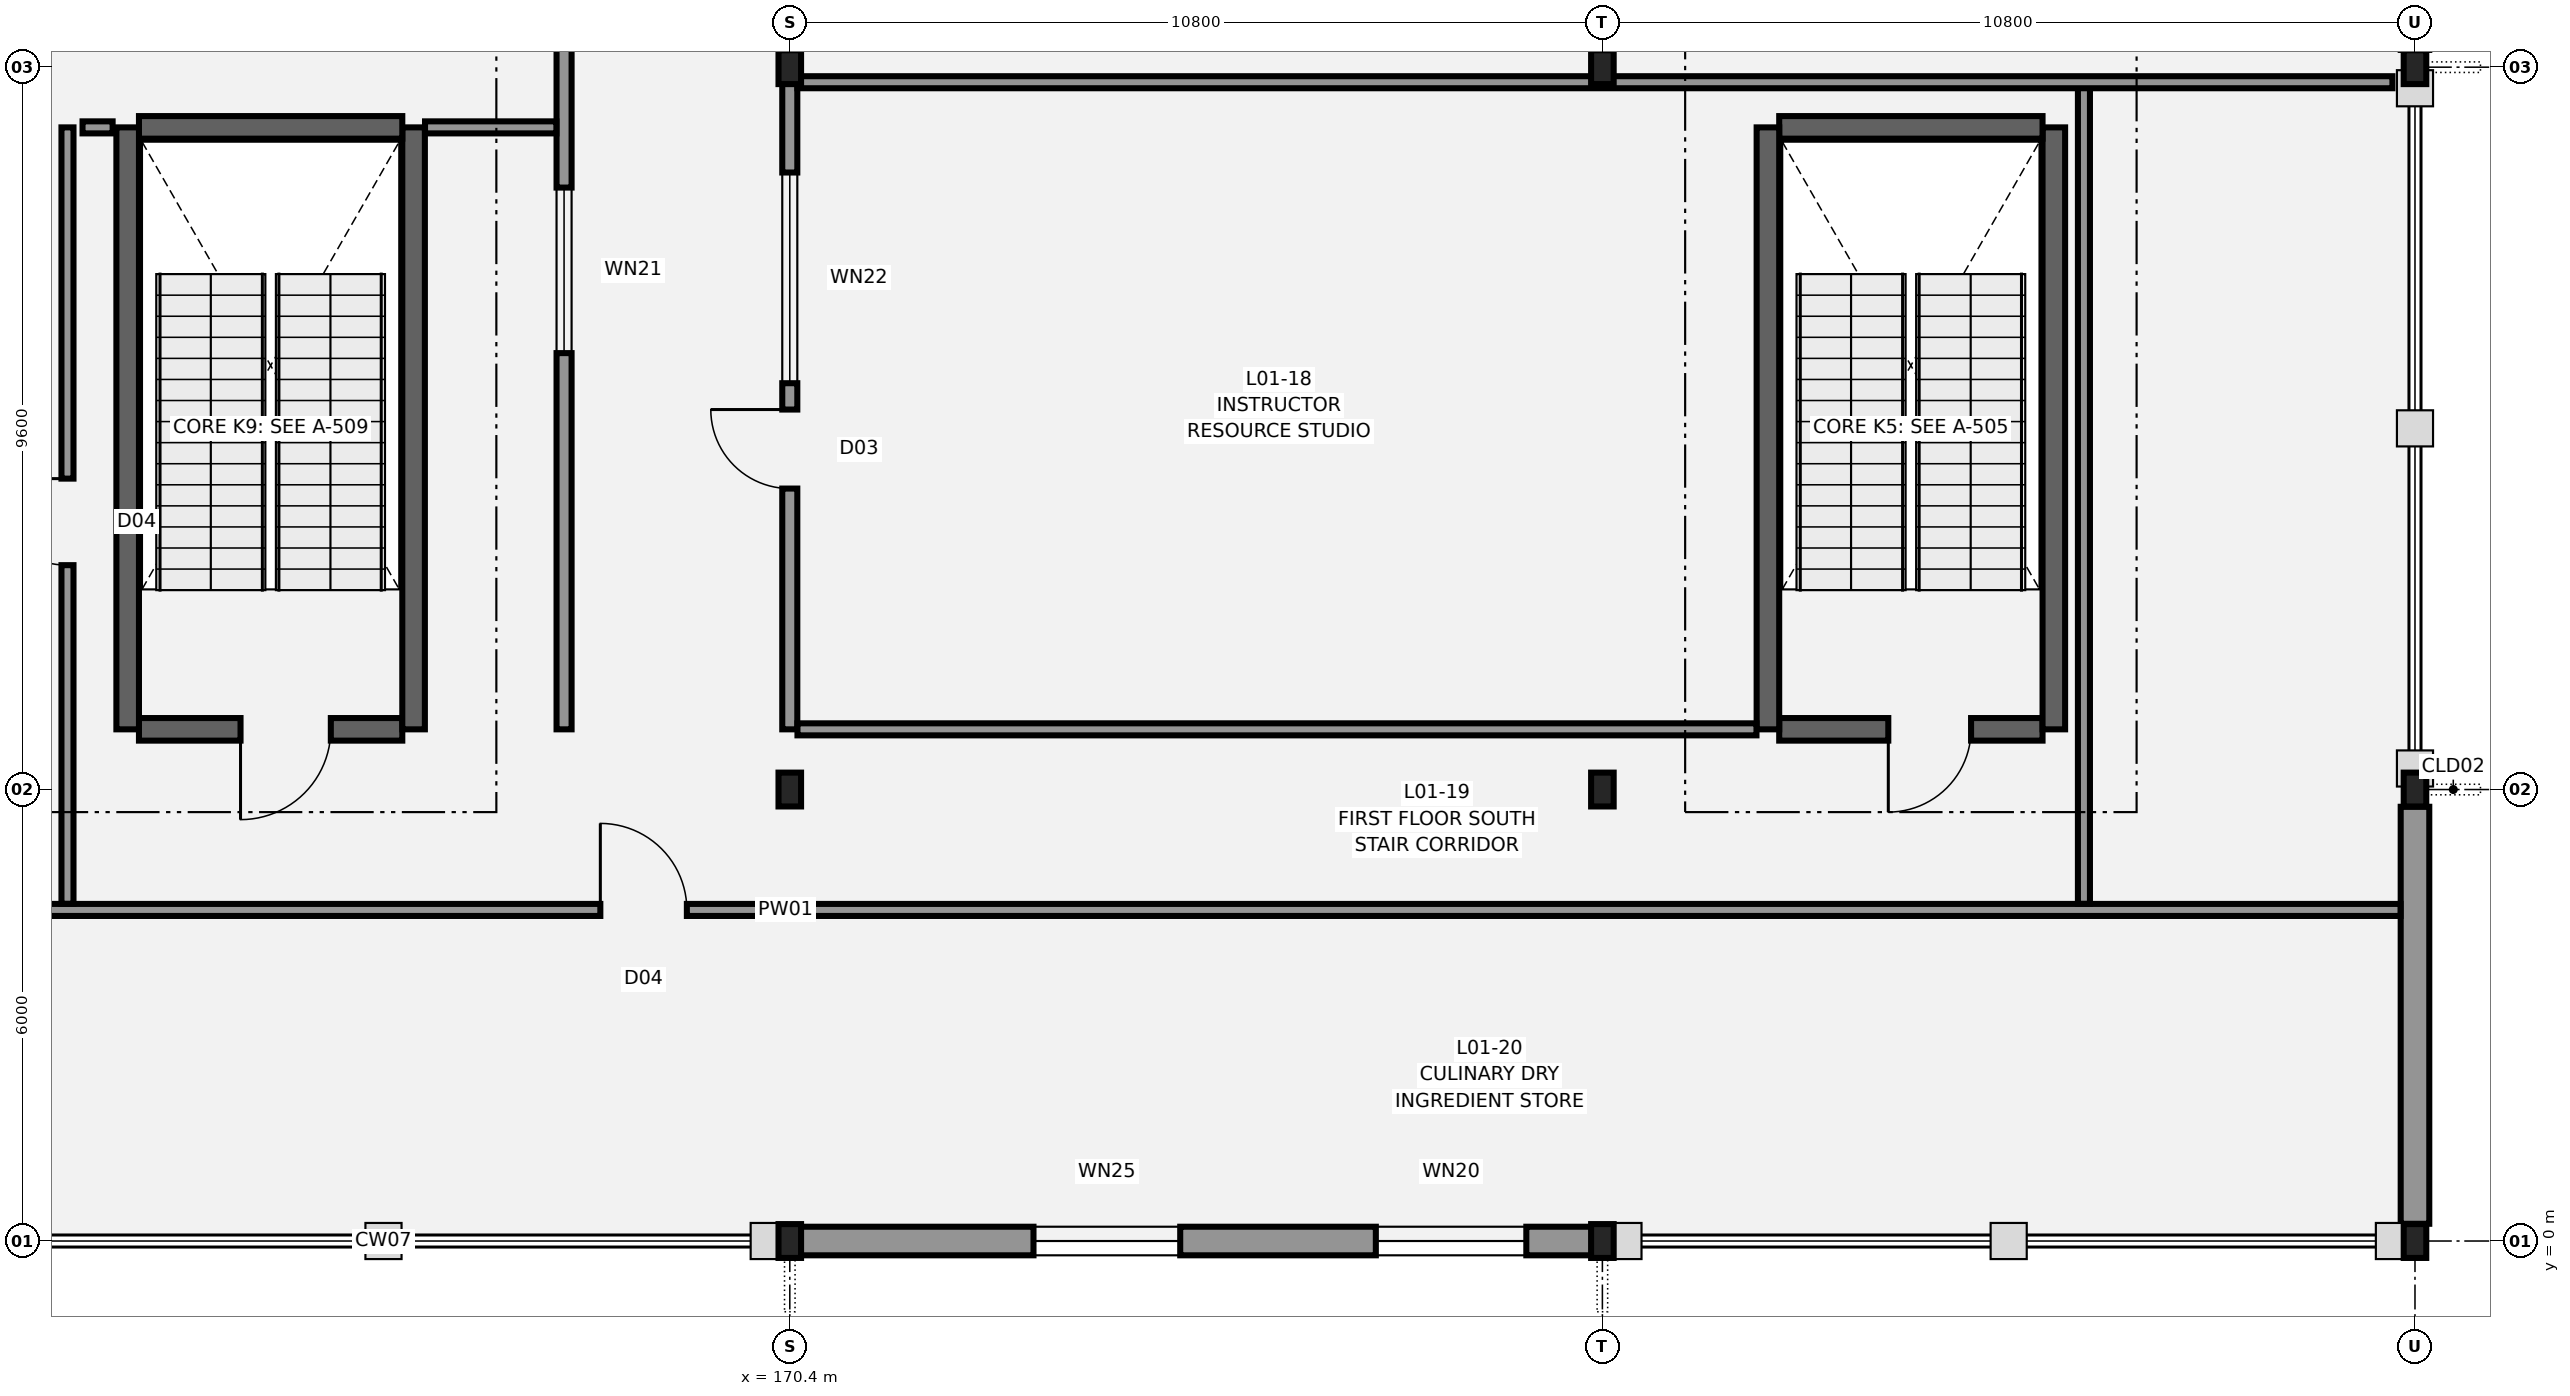
"""IFC4 building model, lengths in metres.
Left out: names, types, materials, properties, quantities, classifications, styles, units other than length and angle.
Written with IfcOpenShell. Run it as: python <this file> out.ifc"""

import sys

from ifc_helpers import new_model, si_unit, direction, frame, frame_2d, origin, origin_2d, place, context, subcontext, project, spatial, rectangle, i_section, extrude, element, fill, save


model = new_model("IFC4")
c1 = context("Model", 3, precision=1e-05, world=origin(), true_north=direction((0.0, 1.0)))
c2 = subcontext(c1, "Body", "Model", "MODEL_VIEW")
j1 = project(units=[si_unit("LENGTHUNIT", "METRE"), si_unit("PLANEANGLEUNIT", "RADIAN")], contexts=[c1])
p1 = place(None, origin())
s1 = spatial("IfcSite", under=j1, at=p1, CompositionType="ELEMENT")
p2 = place(p1, origin())
s2 = spatial("IfcBuilding", under=s1, at=p2, CompositionType="ELEMENT")
p3 = place(p2, frame((0.0, 0.0, 5.4)))
s3 = spatial("IfcBuildingStorey", under=s2, at=p3, CompositionType="ELEMENT", Elevation=5.4)
for number, where, z_axis, x_axis in (
    (1, (170.4, 0.0, 0.0), (0.0, 0.0, 1.0), (1.0, 0.0, 0.0)),
    (2, (170.4, 6.0, 0.0), (0.0, 0.0, 1.0), (1.0, 0.0, 0.0)),
    (3, (170.4, 15.6, 0.0), (0.0, 0.0, 1.0), (1.0, 0.0, 0.0)),
    (4, (181.2, 0.0, 0.0), (0.0, 0.0, 1.0), (1.0, 0.0, 0.0)),
    (5, (181.2, 6.0, 0.0), (0.0, 0.0, 1.0), (1.0, 0.0, 0.0)),
    (6, (181.2, 15.6, 0.0), (0.0, 0.0, 1.0), (1.0, 0.0, 0.0)),
    (7, (192.0, 0.0, 0.0), (0.0, 0.0, 1.0), (1.0, 0.0, 0.0)),
    (8, (192.0, 6.0, 0.0), (0.0, 0.0, 1.0), (1.0, 0.0, 0.0)),
    (9, (192.0, 15.6, 0.0), (0.0, 0.0, 1.0), (1.0, 0.0, 0.0)),
):
    element("IfcColumn", number, at=place(p3, frame(where, z_axis=z_axis, x_axis=x_axis)), inside=s3, PredefinedType="COLUMN", context=c2, shape_type="SweptSolid", body=[
        extrude(i_section(OverallWidth=0.3, OverallDepth=0.45, WebThickness=0.014, FlangeThickness=0.026, FilletRadius=0.027, at=origin_2d()), origin(), (0.0, 0.0, 1.0), 4.8),
    ])
p4 = place(p3, frame((187.05, 6.8, 0.0), z_axis=(0.0, 0.0, 1.0), x_axis=(-1.0, 0.0, 0.0)))
e10 = element("IfcWall", 10, at=p4, inside=s3, PredefinedType="SHEAR", context=c2, shape_type="SweptSolid", body=[
    extrude(rectangle(XDim=3.5, YDim=0.3, at=frame_2d((1.75, 0.0))), origin(), (0.0, 0.0, 1.0), 4.49),
])
p5 = place(p4, frame((0.95, 0.0, 0.0)))
e11 = element("IfcOpeningElement", 11, at=p5, cuts=e10, PredefinedType="OPENING", context=c2, shape_type="SweptSolid", body=[
    extrude(rectangle(XDim=1.1, YDim=2.15, at=frame_2d((0.55, 1.075))), frame((0.0, 0.16, 0.0), z_axis=(0.0, -1.0, 0.0), x_axis=(1.0, 0.0, 0.0)), (0.0, 0.0, 1.0), 0.32),
])
p6 = place(p3, frame((187.2, 6.8, 0.0), z_axis=(0.0, 0.0, 1.0), x_axis=(0.0, 1.0, 0.0)))
e12 = element("IfcWall", 12, at=p6, inside=s3, PredefinedType="SHEAR", context=c2, shape_type="SweptSolid", body=[
    extrude(rectangle(XDim=8.0, YDim=0.3, at=frame_2d((4.0, 0.0))), origin(), (0.0, 0.0, 1.0), 4.49),
])
p7 = place(p3, frame((187.05, 14.8, 0.0), z_axis=(0.0, 0.0, 1.0), x_axis=(-1.0, 0.0, 0.0)))
e13 = element("IfcWall", 13, at=p7, inside=s3, PredefinedType="SHEAR", context=c2, shape_type="SweptSolid", body=[
    extrude(rectangle(XDim=3.5, YDim=0.3, at=frame_2d((1.75, 0.0))), origin(), (0.0, 0.0, 1.0), 4.49),
])
p8 = place(p3, frame((183.4, 14.8, 0.0), z_axis=(0.0, 0.0, 1.0), x_axis=(0.0, -1.0, 0.0)))
e14 = element("IfcWall", 14, at=p8, inside=s3, PredefinedType="SHEAR", context=c2, shape_type="SweptSolid", body=[
    extrude(rectangle(XDim=8.0, YDim=0.3, at=frame_2d((4.0, 0.0))), origin(), (0.0, 0.0, 1.0), 4.49),
])
p9 = place(p3, frame((165.25, 6.8, 0.0), z_axis=(0.0, 0.0, 1.0), x_axis=(-1.0, 0.0, 0.0)))
e15 = element("IfcWall", 15, at=p9, inside=s3, PredefinedType="SHEAR", context=c2, shape_type="SweptSolid", body=[
    extrude(rectangle(XDim=3.5, YDim=0.3, at=frame_2d((1.75, 0.0))), origin(), (0.0, 0.0, 1.0), 4.49),
])
p10 = place(p9, frame((0.95, 0.0, 0.0)))
e16 = element("IfcOpeningElement", 16, at=p10, cuts=e15, PredefinedType="OPENING", context=c2, shape_type="SweptSolid", body=[
    extrude(rectangle(XDim=1.2, YDim=2.2, at=frame_2d((0.6, 1.1))), frame((0.0, 0.16, 0.0), z_axis=(0.0, -1.0, 0.0), x_axis=(1.0, 0.0, 0.0)), (0.0, 0.0, 1.0), 0.32),
])
p11 = place(p3, frame((165.4, 6.8, 0.0), z_axis=(0.0, 0.0, 1.0), x_axis=(0.0, 1.0, 0.0)))
e17 = element("IfcWall", 17, at=p11, inside=s3, PredefinedType="SHEAR", context=c2, shape_type="SweptSolid", body=[
    extrude(rectangle(XDim=8.0, YDim=0.3, at=frame_2d((4.0, 0.0))), origin(), (0.0, 0.0, 1.0), 4.49),
])
p12 = place(p3, frame((165.25, 14.8, 0.0), z_axis=(0.0, 0.0, 1.0), x_axis=(-1.0, 0.0, 0.0)))
e18 = element("IfcWall", 18, at=p12, inside=s3, PredefinedType="SHEAR", context=c2, shape_type="SweptSolid", body=[
    extrude(rectangle(XDim=3.5, YDim=0.3, at=frame_2d((1.75, 0.0))), origin(), (0.0, 0.0, 1.0), 4.49),
])
p13 = place(p3, frame((161.6, 14.8, 0.0), z_axis=(0.0, 0.0, 1.0), x_axis=(0.0, -1.0, 0.0)))
e19 = element("IfcWall", 19, at=p13, inside=s3, PredefinedType="SHEAR", context=c2, shape_type="SweptSolid", body=[
    extrude(rectangle(XDim=8.0, YDim=0.3, at=frame_2d((4.0, 0.0))), origin(), (0.0, 0.0, 1.0), 4.49),
])
p14 = place(p3, frame((181.189, 0.0, 0.0), z_axis=(0.0, 0.0, 1.0), x_axis=(-1.0, 0.0, 0.0)))
e20 = element("IfcWall", 20, at=p14, inside=s3, PredefinedType="STANDARD", context=c2, shape_type="SweptSolid", body=[
    extrude(rectangle(XDim=10.778, YDim=0.38, at=frame_2d((5.389, 0.0))), origin(), (0.0, 0.0, 1.0), 4.045),
])
p15 = place(p14, frame((1.0, 0.0, 0.8)))
e21 = element("IfcOpeningElement", 21, at=p15, cuts=e20, PredefinedType="OPENING", context=c2, shape_type="SweptSolid", body=[
    extrude(rectangle(XDim=2.0, YDim=1.6, at=frame_2d((1.0, 0.8))), frame((0.0, 0.2, 0.0), z_axis=(0.0, -1.0, 0.0), x_axis=(1.0, 0.0, 0.0)), (0.0, 0.0, 1.0), 0.4),
])
p16 = place(p14, frame((5.6, 0.0, 0.8)))
e22 = element("IfcOpeningElement", 22, at=p16, cuts=e20, PredefinedType="OPENING", context=c2, shape_type="SweptSolid", body=[
    extrude(rectangle(XDim=1.95, YDim=1.75, at=frame_2d((0.975, 0.875))), frame((0.0, 0.2, 0.0), z_axis=(0.0, -1.0, 0.0), x_axis=(1.0, 0.0, 0.0)), (0.0, 0.0, 1.0), 0.4),
])
p17 = place(p3, frame((192.0, 5.771, 0.0), z_axis=(0.0, 0.0, 1.0), x_axis=(0.0, -1.0, 0.0)))
e23 = element("IfcWall", 23, at=p17, inside=s3, PredefinedType="STANDARD", context=c2, shape_type="SweptSolid", body=[
    extrude(rectangle(XDim=5.542, YDim=0.38, at=frame_2d((2.771, 0.0))), origin(), (0.0, 0.0, 1.0), 4.135),
])
p18 = place(p3, frame((148.882, 4.4, 0.0), z_axis=(0.0, 0.0, 1.0), x_axis=(1.0, 0.0, 0.0)))
e24 = element("IfcWall", 24, at=p18, inside=s3, PredefinedType="PARTITIONING", context=c2, shape_type="SweptSolid", body=[
    extrude(rectangle(XDim=42.926, YDim=0.16, at=frame_2d((21.463, 0.0))), origin(), (0.0, 0.0, 1.0), 4.44),
])
p19 = place(p18, frame((19.0, 0.0, 0.0)))
e25 = element("IfcOpeningElement", 25, at=p19, cuts=e24, PredefinedType="OPENING", context=c2, shape_type="SweptSolid", body=[
    extrude(rectangle(XDim=1.15, YDim=2.15, at=frame_2d((0.575, 1.075))), frame((0.0, 0.09, 0.0), z_axis=(0.0, -1.0, 0.0), x_axis=(1.0, 0.0, 0.0)), (0.0, 0.0, 1.0), 0.18),
])
p20 = place(p3, frame((167.4, 6.8, 0.0), z_axis=(0.0, 0.0, 1.0), x_axis=(0.0, 1.0, 0.0)))
e26 = element("IfcWall", 26, at=p20, inside=s3, PredefinedType="PARTITIONING", context=c2, shape_type="SweptSolid", body=[
    extrude(rectangle(XDim=56.628, YDim=0.2, at=frame_2d((28.314, 0.0))), origin(), (0.0, 0.0, 1.0), 4.44),
])
p21 = place(p20, frame((12.0, 0.0, 0.0)))
e27 = element("IfcOpeningElement", 27, at=p21, cuts=e26, PredefinedType="OPENING", context=c2, shape_type="SweptSolid", body=[
    extrude(rectangle(XDim=1.4, YDim=2.2, at=frame_2d((0.7, 1.1))), frame((0.0, 0.11, 0.0), z_axis=(0.0, -1.0, 0.0), x_axis=(1.0, 0.0, 0.0)), (0.0, 0.0, 1.0), 0.22),
])
p22 = place(p20, frame((40.133, 0.0, 0.0)))
e28 = element("IfcOpeningElement", 28, at=p22, cuts=e26, PredefinedType="OPENING", context=c2, shape_type="SweptSolid", body=[
    extrude(rectangle(XDim=1.4, YDim=2.2, at=frame_2d((0.7, 1.1))), frame((0.0, 0.11, 0.0), z_axis=(0.0, -1.0, 0.0), x_axis=(1.0, 0.0, 0.0)), (0.0, 0.0, 1.0), 0.22),
])
p23 = place(p20, frame((5.0, 0.0, 1.05)))
e29 = element("IfcOpeningElement", 29, at=p23, cuts=e26, PredefinedType="OPENING", context=c2, shape_type="SweptSolid", body=[
    extrude(rectangle(XDim=2.2, YDim=1.3, at=frame_2d((1.1, 0.65))), frame((0.0, 0.11, 0.0), z_axis=(0.0, -1.0, 0.0), x_axis=(1.0, 0.0, 0.0)), (0.0, 0.0, 1.0), 0.22),
])
p24 = place(p3, frame((160.8, 4.482, 0.0), z_axis=(0.0, 0.0, 1.0), x_axis=(0.0, 1.0, 0.0)))
e30 = element("IfcWall", 30, at=p24, inside=s3, PredefinedType="PARTITIONING", context=c2, shape_type="SweptSolid", body=[
    extrude(rectangle(XDim=10.318, YDim=0.16, at=frame_2d((5.159, 0.0))), origin(), (0.0, 0.0, 1.0), 4.44),
])
p25 = place(p24, frame((4.5, 0.0, 0.0)))
e31 = element("IfcOpeningElement", 31, at=p25, cuts=e30, PredefinedType="OPENING", context=c2, shape_type="SweptSolid", body=[
    extrude(rectangle(XDim=1.15, YDim=2.15, at=frame_2d((0.575, 1.075))), frame((0.0, 0.09, 0.0), z_axis=(0.0, -1.0, 0.0), x_axis=(1.0, 0.0, 0.0)), (0.0, 0.0, 1.0), 0.18),
])
p26 = place(p3, frame((161.0, 14.8, 0.0), z_axis=(0.0, 0.0, 1.0), x_axis=(1.0, 0.0, 0.0)))
e32 = element("IfcWall", 32, at=p26, inside=s3, PredefinedType="PARTITIONING", context=c2, shape_type="SweptSolid", body=[
    extrude(rectangle(XDim=0.4, YDim=0.16, at=frame_2d((0.2, 0.0))), origin(), (0.0, 0.0, 1.0), 4.44),
])
p27 = place(p3, frame((165.552, 14.8, 0.0), z_axis=(0.0, 0.0, 1.0), x_axis=(1.0, 0.0, 0.0)))
e33 = element("IfcWall", 33, at=p27, inside=s3, PredefinedType="PARTITIONING", context=c2, shape_type="SweptSolid", body=[
    extrude(rectangle(XDim=1.746, YDim=0.16, at=frame_2d((0.873, 0.0))), origin(), (0.0, 0.0, 1.0), 4.44),
])
p28 = place(p3, frame((170.4, 6.8, 0.0), z_axis=(0.0, 0.0, 1.0), x_axis=(0.0, 1.0, 0.0)))
e34 = element("IfcWall", 34, at=p28, inside=s3, PredefinedType="PARTITIONING", context=c2, shape_type="SweptSolid", body=[
    extrude(rectangle(XDim=56.628, YDim=0.2, at=frame_2d((28.314, 0.0))), origin(), (0.0, 0.0, 1.0), 4.135),
])
p29 = place(p28, frame((3.2, 0.0, 0.0)))
e35 = element("IfcOpeningElement", 35, at=p29, cuts=e34, PredefinedType="OPENING", context=c2, shape_type="SweptSolid", body=[
    extrude(rectangle(XDim=1.05, YDim=2.15, at=frame_2d((0.525, 1.075))), frame((0.0, 0.11, 0.0), z_axis=(0.0, -1.0, 0.0), x_axis=(1.0, 0.0, 0.0)), (0.0, 0.0, 1.0), 0.22),
])
p30 = place(p28, frame((13.0, 0.0, 0.0)))
e36 = element("IfcOpeningElement", 36, at=p30, cuts=e34, PredefinedType="OPENING", context=c2, shape_type="SweptSolid", body=[
    extrude(rectangle(XDim=1.6, YDim=2.2, at=frame_2d((0.8, 1.1))), frame((0.0, 0.11, 0.0), z_axis=(0.0, -1.0, 0.0), x_axis=(1.0, 0.0, 0.0)), (0.0, 0.0, 1.0), 0.22),
])
p31 = place(p28, frame((26.0, 0.0, 0.0)))
e37 = element("IfcOpeningElement", 37, at=p31, cuts=e34, PredefinedType="OPENING", context=c2, shape_type="SweptSolid", body=[
    extrude(rectangle(XDim=1.3, YDim=2.15, at=frame_2d((0.65, 1.075))), frame((0.0, 0.11, 0.0), z_axis=(0.0, -1.0, 0.0), x_axis=(1.0, 0.0, 0.0)), (0.0, 0.0, 1.0), 0.22),
])
p32 = place(p28, frame((47.6, 0.0, 0.0)))
e38 = element("IfcOpeningElement", 38, at=p32, cuts=e34, PredefinedType="OPENING", context=c2, shape_type="SweptSolid", body=[
    extrude(rectangle(XDim=1.3, YDim=2.15, at=frame_2d((0.65, 1.075))), frame((0.0, 0.11, 0.0), z_axis=(0.0, -1.0, 0.0), x_axis=(1.0, 0.0, 0.0)), (0.0, 0.0, 1.0), 0.22),
])
p33 = place(p28, frame((53.2, 0.0, 0.0)))
e39 = element("IfcOpeningElement", 39, at=p33, cuts=e34, PredefinedType="OPENING", context=c2, shape_type="SweptSolid", body=[
    extrude(rectangle(XDim=1.02, YDim=2.12, at=frame_2d((0.51, 1.06))), frame((0.0, 0.11, 0.0), z_axis=(0.0, -1.0, 0.0), x_axis=(1.0, 0.0, 0.0)), (0.0, 0.0, 1.0), 0.22),
])
p34 = place(p28, frame((4.6, 0.0, 1.05)))
e40 = element("IfcOpeningElement", 40, at=p34, cuts=e34, PredefinedType="OPENING", context=c2, shape_type="SweptSolid", body=[
    extrude(rectangle(XDim=2.8, YDim=1.3, at=frame_2d((1.4, 0.65))), frame((0.0, 0.11, 0.0), z_axis=(0.0, -1.0, 0.0), x_axis=(1.0, 0.0, 0.0)), (0.0, 0.0, 1.0), 0.22),
])
p35 = place(p3, frame((170.502, 6.8, 0.0), z_axis=(0.0, 0.0, 1.0), x_axis=(1.0, 0.0, 0.0)))
e41 = element("IfcWall", 41, at=p35, inside=s3, PredefinedType="PARTITIONING", context=c2, shape_type="SweptSolid", body=[
    extrude(rectangle(XDim=12.746, YDim=0.16, at=frame_2d((6.373, 0.0))), origin(), (0.0, 0.0, 1.0), 4.44),
])
p36 = place(p3, frame((187.6, 4.482, 0.0), z_axis=(0.0, 0.0, 1.0), x_axis=(0.0, 1.0, 0.0)))
e42 = element("IfcWall", 42, at=p36, inside=s3, PredefinedType="PARTITIONING", context=c2, shape_type="SweptSolid", body=[
    extrude(rectangle(XDim=10.918, YDim=0.16, at=frame_2d((5.459, 0.0))), origin(), (0.0, 0.0, 1.0), 4.44),
])
p37 = place(p3, frame((170.502, 15.4, 0.0), z_axis=(0.0, 0.0, 1.0), x_axis=(1.0, 0.0, 0.0)))
e43 = element("IfcWall", 43, at=p37, inside=s3, PredefinedType="PARTITIONING", context=c2, shape_type="SweptSolid", body=[
    extrude(rectangle(XDim=21.198, YDim=0.16, at=frame_2d((10.599, 0.0))), origin(), (0.0, 0.0, 1.0), 4.045),
])
p38 = place(p15, origin())
e44 = element("IfcWindow", 44, at=p38, inside=s3, PartitioningType="SINGLE_PANEL", PredefinedType="WINDOW", context=c2, shape_type="SweptSolid", body=[
    extrude(rectangle(XDim=2.0, YDim=1.6, at=frame_2d((1.0, 0.8))), frame((0.0, 0.03, 0.0), z_axis=(0.0, -1.0, 0.0), x_axis=(1.0, 0.0, 0.0)), (0.0, 0.0, 1.0), 0.06),
])
fill(e21, e44)
p39 = place(p16, origin())
e45 = element("IfcWindow", 45, at=p39, inside=s3, PartitioningType="SINGLE_PANEL", PredefinedType="WINDOW", context=c2, shape_type="SweptSolid", body=[
    extrude(rectangle(XDim=1.95, YDim=1.75, at=frame_2d((0.975, 0.875))), frame((0.0, 0.03, 0.0), z_axis=(0.0, -1.0, 0.0), x_axis=(1.0, 0.0, 0.0)), (0.0, 0.0, 1.0), 0.06),
])
fill(e22, e45)
p40 = place(p19, origin())
e46 = element("IfcDoor", 46, at=p40, inside=s3, OperationType="SINGLE_SWING_LEFT", PredefinedType="DOOR", context=c2, shape_type="SweptSolid", body=[
    extrude(rectangle(XDim=1.15, YDim=2.15, at=frame_2d((0.575, 1.075))), frame((0.0, 0.025, 0.0), z_axis=(0.0, -1.0, 0.0), x_axis=(1.0, 0.0, 0.0)), (0.0, 0.0, 1.0), 0.05),
])
fill(e25, e46)
p41 = place(p25, origin())
e47 = element("IfcDoor", 47, at=p41, inside=s3, OperationType="SINGLE_SWING_RIGHT", PredefinedType="DOOR", context=c2, shape_type="SweptSolid", body=[
    extrude(rectangle(XDim=1.15, YDim=2.15, at=frame_2d((0.575, 1.075))), frame((0.0, 0.025, 0.0), z_axis=(0.0, -1.0, 0.0), x_axis=(1.0, 0.0, 0.0)), (0.0, 0.0, 1.0), 0.05),
])
fill(e31, e47)
p42 = place(p29, origin())
e48 = element("IfcDoor", 48, at=p42, inside=s3, OperationType="SINGLE_SWING_RIGHT", PredefinedType="DOOR", context=c2, shape_type="SweptSolid", body=[
    extrude(rectangle(XDim=1.05, YDim=2.15, at=frame_2d((0.525, 1.075))), frame((0.0, 0.025, 0.0), z_axis=(0.0, -1.0, 0.0), x_axis=(1.0, 0.0, 0.0)), (0.0, 0.0, 1.0), 0.05),
])
fill(e35, e48)
p43 = place(p23, origin())
e49 = element("IfcWindow", 49, at=p43, inside=s3, PartitioningType="SINGLE_PANEL", PredefinedType="WINDOW", context=c2, shape_type="SweptSolid", body=[
    extrude(rectangle(XDim=2.2, YDim=1.3, at=frame_2d((1.1, 0.65))), frame((0.0, 0.03, 0.0), z_axis=(0.0, -1.0, 0.0), x_axis=(1.0, 0.0, 0.0)), (0.0, 0.0, 1.0), 0.06),
])
fill(e29, e49)
p44 = place(p34, origin())
e50 = element("IfcWindow", 50, at=p44, inside=s3, PartitioningType="SINGLE_PANEL", PredefinedType="WINDOW", context=c2, shape_type="SweptSolid", body=[
    extrude(rectangle(XDim=2.8, YDim=1.3, at=frame_2d((1.4, 0.65))), frame((0.0, 0.03, 0.0), z_axis=(0.0, -1.0, 0.0), x_axis=(1.0, 0.0, 0.0)), (0.0, 0.0, 1.0), 0.06),
])
fill(e40, e50)
p45 = place(p5, origin())
e51 = element("IfcDoor", 51, at=p45, inside=s3, OperationType="SINGLE_SWING_RIGHT", PredefinedType="DOOR", context=c2, shape_type="SweptSolid", body=[
    extrude(rectangle(XDim=1.1, YDim=2.15, at=frame_2d((0.55, 1.075))), frame((0.0, 0.025, 0.0), z_axis=(0.0, -1.0, 0.0), x_axis=(1.0, 0.0, 0.0)), (0.0, 0.0, 1.0), 0.05),
])
fill(e11, e51)
p46 = place(p10, origin())
e52 = element("IfcDoor", 52, at=p46, inside=s3, OperationType="SINGLE_SWING_RIGHT", PredefinedType="DOOR", context=c2, shape_type="SweptSolid", body=[
    extrude(rectangle(XDim=1.2, YDim=2.2, at=frame_2d((0.6, 1.1))), frame((0.0, 0.025, 0.0), z_axis=(0.0, -1.0, 0.0), x_axis=(1.0, 0.0, 0.0)), (0.0, 0.0, 1.0), 0.05),
])
fill(e16, e52)
save(model, sys.argv[1])
